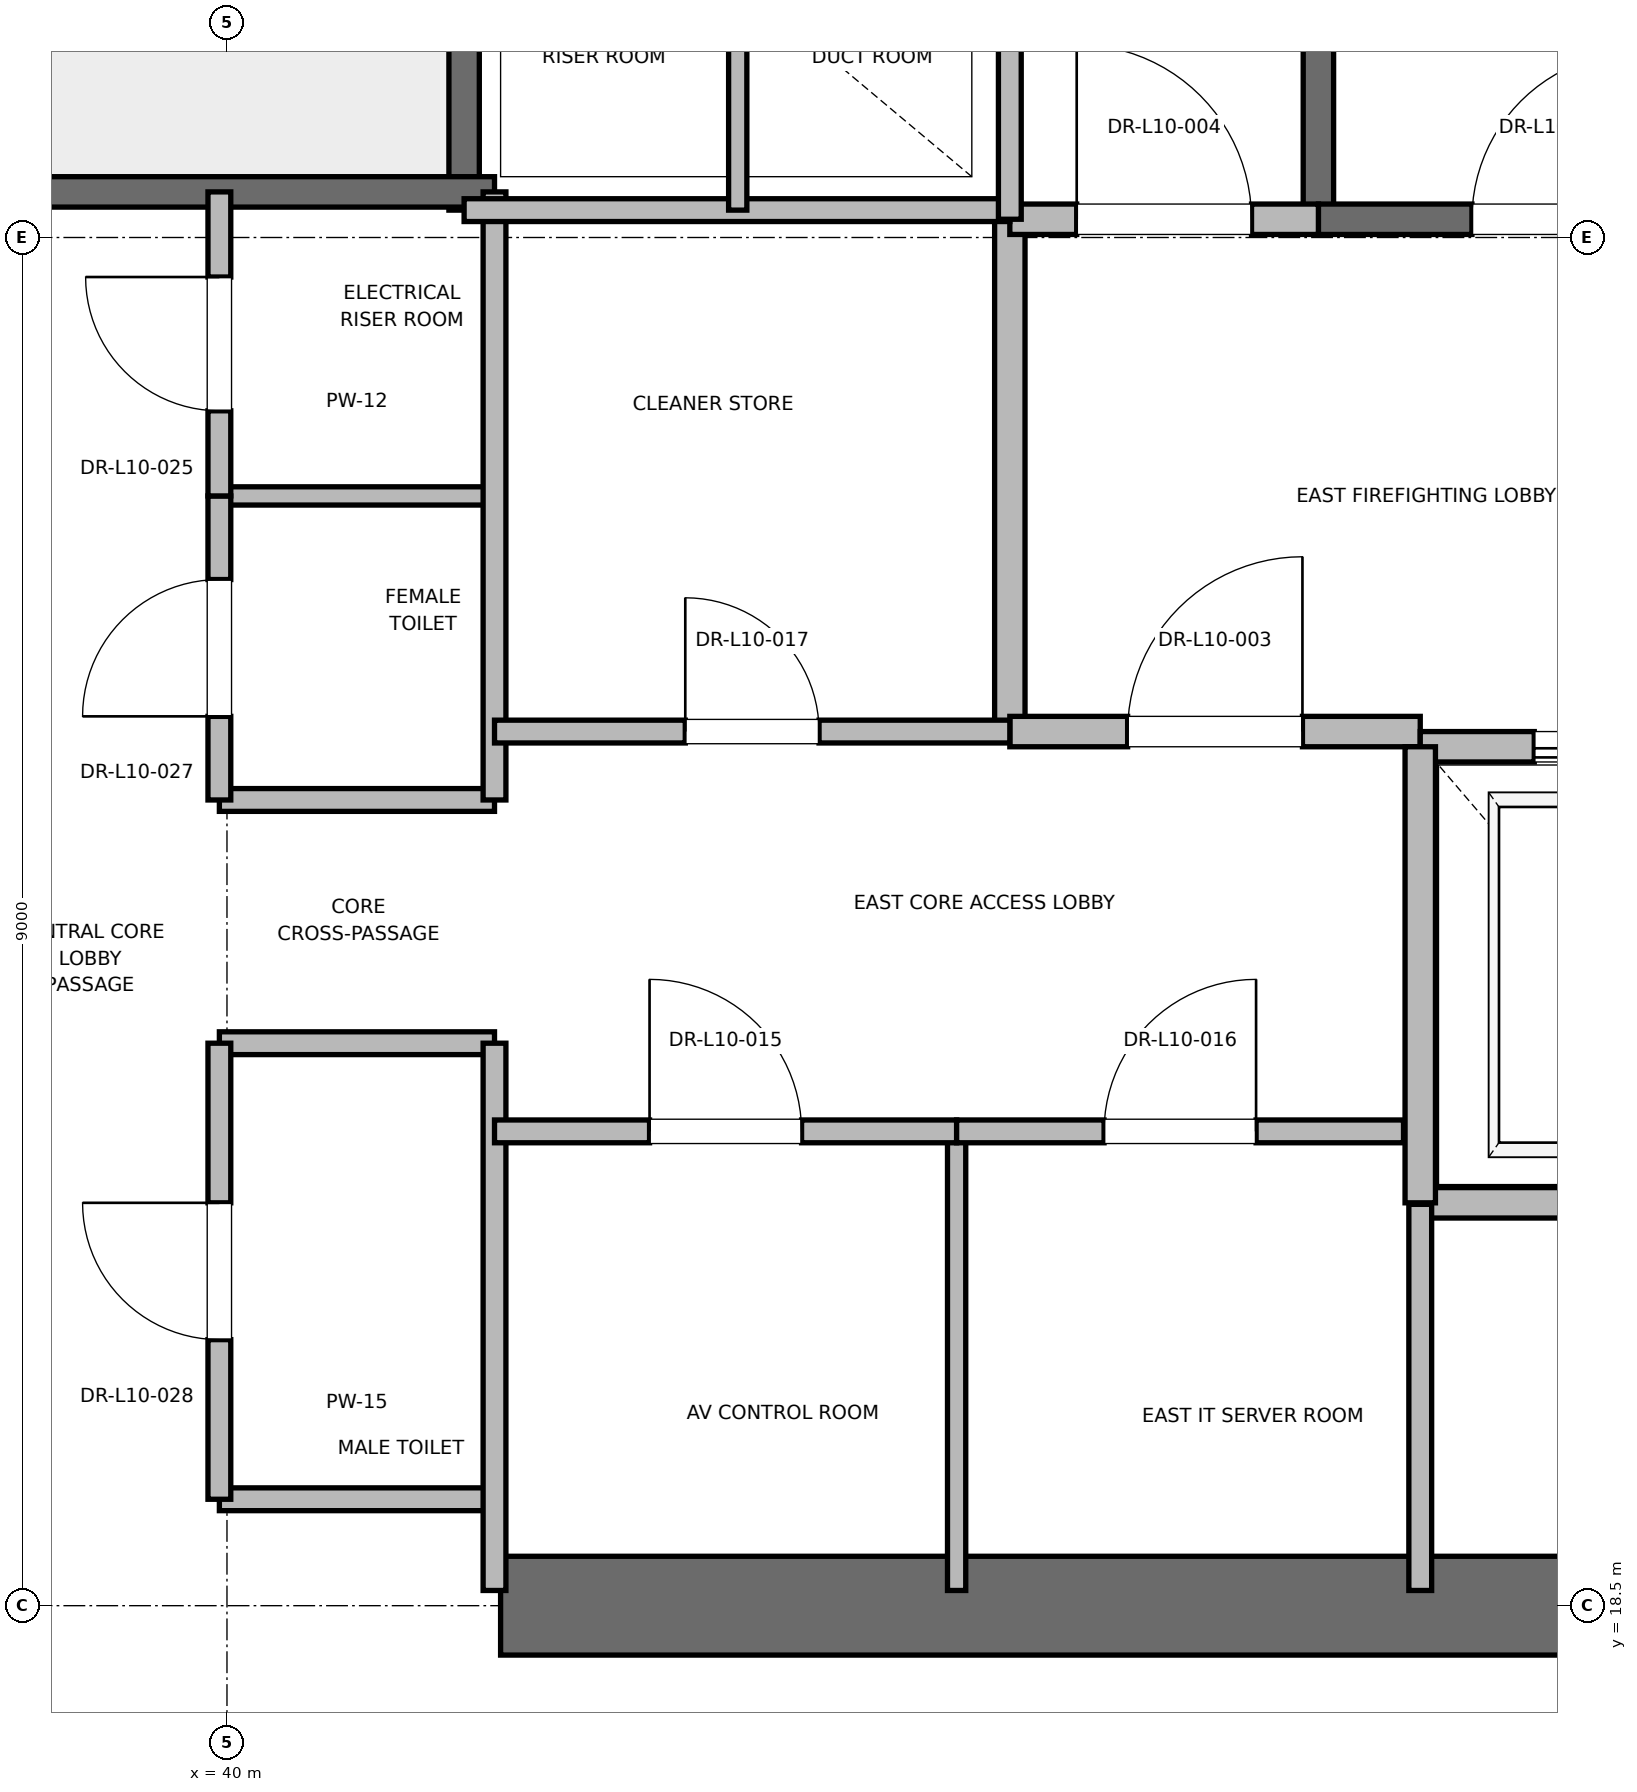
"""IFC4 building model, lengths in metres.
Left out: names, types, materials, properties, quantities, classifications, styles, units other than length and angle.
Written with IfcOpenShell. Run it as: python <this file> out.ifc"""

import sys

from ifc_helpers import new_model, si_unit, direction, frame, frame_2d, origin, place, context, subcontext, project, spatial, rectangle, extrude, element, fill, save


model = new_model("IFC4")
c1 = context("Model", 3, precision=1e-05, world=origin(), true_north=direction((0.0, 1.0)))
c2 = subcontext(c1, "Body", "Model", "MODEL_VIEW")
j1 = project(units=[si_unit("LENGTHUNIT", "METRE"), si_unit("PLANEANGLEUNIT", "RADIAN")], contexts=[c1])
p1 = place(None, origin())
s1 = spatial("IfcSite", under=j1, at=p1, CompositionType="ELEMENT")
p2 = place(p1, origin())
s2 = spatial("IfcBuilding", under=s1, at=p2, CompositionType="ELEMENT")
p3 = place(p2, frame((0.0, 0.0, 47.6)))
s3 = spatial("IfcBuildingStorey", under=s2, at=p3, CompositionType="ELEMENT", Elevation=47.6)
p4 = place(p3, frame((41.8, 18.5, 0.0), z_axis=(0.0, 0.0, 1.0), x_axis=(1.0, 0.0, 0.0)))
e1 = element("IfcWall", 1, at=p4, inside=s3, PredefinedType="SHEAR", context=c2, shape_type="SweptSolid", body=[
    extrude(rectangle(XDim=9.2, YDim=0.65, at=frame_2d((4.6, 0.0))), origin(), (0.0, 0.0, 1.0), 3.76),
])
p5 = place(p3, frame((47.18, 27.62, 0.0), z_axis=(0.0, 0.0, 1.0), x_axis=(0.0, 1.0, 0.0)))
e2 = element("IfcWall", 2, at=p5, inside=s3, PredefinedType="SOLIDWALL", context=c2, shape_type="SweptSolid", body=[
    extrude(rectangle(XDim=8.18, YDim=0.2, at=frame_2d((4.09, 0.0))), origin(), (0.0, 0.0, 1.0), 3.76),
])
p6 = place(p3, frame((47.18, 27.62, 0.0), z_axis=(0.0, 0.0, 1.0), x_axis=(1.0, 0.0, 0.0)))
e3 = element("IfcWall", 3, at=p6, inside=s3, PredefinedType="SOLIDWALL", context=c2, shape_type="SweptSolid", body=[
    extrude(rectangle(XDim=3.12, YDim=0.2, at=frame_2d((1.56, 0.0))), origin(), (0.0, 0.0, 1.0), 3.76),
])
p7 = place(p6, frame((1.01, 0.0, 0.0)))
e4 = element("IfcOpeningElement", 4, at=p7, cuts=e3, PredefinedType="OPENING", context=c2, shape_type="SweptSolid", body=[
    extrude(rectangle(XDim=1.1, YDim=2.15, at=frame_2d((0.55, 1.075))), frame((0.0, 0.1, 0.0), z_axis=(0.0, -1.0, 0.0), x_axis=(1.0, 0.0, 0.0)), (0.0, 0.0, 1.0), 0.2),
])
p8 = place(p3, frame((41.56, 27.68, 0.0), z_axis=(0.0, 0.0, 1.0), x_axis=(0.0, 1.0, 0.0)))
e5 = element("IfcWall", 5, at=p8, inside=s3, PredefinedType="SOLIDWALL", context=c2, shape_type="SweptSolid", body=[
    extrude(rectangle(XDim=8.57, YDim=0.2, at=frame_2d((4.285, 0.0))), origin(), (0.0, 0.0, 1.0), 3.76),
])
p9 = place(p3, frame((38.44, 27.8, 0.0), z_axis=(0.0, 0.0, 1.0), x_axis=(1.0, 0.0, 0.0)))
e6 = element("IfcWall", 6, at=p9, inside=s3, PredefinedType="SOLIDWALL", context=c2, shape_type="SweptSolid", body=[
    extrude(rectangle(XDim=3.32, YDim=0.2, at=frame_2d((1.66, 0.0))), origin(), (0.0, 0.0, 1.0), 3.76),
])
p10 = place(p3, frame((45.15, 24.25, 0.0), z_axis=(0.0, 0.0, 1.0), x_axis=(0.0, 1.0, 0.0)))
e7 = element("IfcWall", 7, at=p10, inside=s3, PredefinedType="PARTITIONING", context=c2, shape_type="SweptSolid", body=[
    extrude(rectangle(XDim=3.37, YDim=0.2, at=frame_2d((1.685, 0.0))), origin(), (0.0, 0.0, 1.0), 3.76),
])
p11 = place(p3, frame((45.15, 24.25, 0.0), z_axis=(0.0, 0.0, 1.0), x_axis=(1.0, 0.0, 0.0)))
e8 = element("IfcWall", 8, at=p11, inside=s3, PredefinedType="PARTITIONING", context=c2, shape_type="SweptSolid", body=[
    extrude(rectangle(XDim=2.7, YDim=0.2, at=frame_2d((1.35, 0.0))), origin(), (0.0, 0.0, 1.0), 3.76),
])
p12 = place(p11, frame((0.775, 0.0, 0.0)))
e9 = element("IfcOpeningElement", 9, at=p12, cuts=e8, PredefinedType="OPENING", context=c2, shape_type="SweptSolid", body=[
    extrude(rectangle(XDim=1.15, YDim=2.2, at=frame_2d((0.575, 1.1))), frame((0.0, 0.1, 0.0), z_axis=(0.0, -1.0, 0.0), x_axis=(1.0, 0.0, 0.0)), (0.0, 0.0, 1.0), 0.2),
])
p13 = place(p3, frame((45.15, 27.62, 0.0), z_axis=(0.0, 0.0, 1.0), x_axis=(1.0, 0.0, 0.0)))
e10 = element("IfcWall", 10, at=p13, inside=s3, PredefinedType="PARTITIONING", context=c2, shape_type="SweptSolid", body=[
    extrude(rectangle(XDim=2.03, YDim=0.2, at=frame_2d((1.015, 0.0))), origin(), (0.0, 0.0, 1.0), 3.76),
])
p14 = place(p13, frame((0.44, 0.0, 0.0)))
e11 = element("IfcOpeningElement", 11, at=p14, cuts=e10, PredefinedType="OPENING", context=c2, shape_type="SweptSolid", body=[
    extrude(rectangle(XDim=1.15, YDim=2.2, at=frame_2d((0.575, 1.1))), frame((0.0, 0.1, 0.0), z_axis=(0.0, -1.0, 0.0), x_axis=(1.0, 0.0, 0.0)), (0.0, 0.0, 1.0), 0.2),
])
p15 = place(p3, frame((47.85, 21.15, 0.0), z_axis=(0.0, 0.0, 1.0), x_axis=(1.0, 0.0, 0.0)))
e12 = element("IfcWall", 12, at=p15, inside=s3, PredefinedType="SOLIDWALL", context=c2, shape_type="SweptSolid", body=[
    extrude(rectangle(XDim=2.6, YDim=0.2, at=frame_2d((1.3, 0.0))), origin(), (0.0, 0.0, 1.0), 3.76),
])
p16 = place(p3, frame((50.45, 24.15, 0.0), z_axis=(0.0, 0.0, 1.0), x_axis=(-1.0, 0.0, 0.0)))
e13 = element("IfcWall", 13, at=p16, inside=s3, PredefinedType="SOLIDWALL", context=c2, shape_type="SweptSolid", body=[
    extrude(rectangle(XDim=2.6, YDim=0.2, at=frame_2d((1.3, 0.0))), origin(), (0.0, 0.0, 1.0), 2.54),
])
p17 = place(p16, frame((0.75, 0.0, 0.0)))
e14 = element("IfcOpeningElement", 14, at=p17, cuts=e13, PredefinedType="OPENING", context=c2, shape_type="SweptSolid", body=[
    extrude(rectangle(XDim=1.1, YDim=2.2, at=frame_2d((0.55, 1.1))), frame((0.0, 0.1, 0.0), z_axis=(0.0, -1.0, 0.0), x_axis=(1.0, 0.0, 0.0)), (0.0, 0.0, 1.0), 0.2),
])
p18 = place(p3, frame((47.85, 24.15, 0.0), z_axis=(0.0, 0.0, 1.0), x_axis=(0.0, -1.0, 0.0)))
e15 = element("IfcWall", 15, at=p18, inside=s3, PredefinedType="SOLIDWALL", context=c2, shape_type="SweptSolid", body=[
    extrude(rectangle(XDim=3.0, YDim=0.2, at=frame_2d((1.5, 0.0))), origin(), (0.0, 0.0, 1.0), 3.76),
])
for number, where, z_axis, x_axis in (
    (16, (39.95, 19.2, 0.0), (0.0, 0.0, 1.0), (1.0, 0.0, 0.0)),
    (17, (39.95, 22.2, 0.0), (0.0, 0.0, 1.0), (1.0, 0.0, 0.0)),
    (18, (39.95, 23.8, 0.0), (0.0, 0.0, 1.0), (1.0, 0.0, 0.0)),
):
    element("IfcWall", number, at=place(p3, frame(where, z_axis=z_axis, x_axis=x_axis)), inside=s3, PredefinedType="PARTITIONING", context=c2, shape_type="SweptSolid", body=[
        extrude(rectangle(XDim=1.81, YDim=0.15, at=frame_2d((0.905, 0.0))), origin(), (0.0, 0.0, 1.0), 2.85),
    ])
p19 = place(p3, frame((39.95, 25.8, 0.0), z_axis=(0.0, 0.0, 1.0), x_axis=(1.0, 0.0, 0.0)))
e19 = element("IfcWall", 19, at=p19, inside=s3, PredefinedType="PARTITIONING", context=c2, shape_type="SweptSolid", body=[
    extrude(rectangle(XDim=1.81, YDim=0.12, at=frame_2d((0.905, 0.0))), origin(), (0.0, 0.0, 1.0), 2.85),
])
p20 = place(p3, frame((41.76, 18.6, 0.0), z_axis=(0.0, 0.0, 1.0), x_axis=(0.0, 1.0, 0.0)))
e20 = element("IfcWall", 20, at=p20, inside=s3, PredefinedType="PARTITIONING", context=c2, shape_type="SweptSolid", body=[
    extrude(rectangle(XDim=3.6, YDim=0.15, at=frame_2d((1.8, 0.0))), origin(), (0.0, 0.0, 1.0), 2.54),
])
p21 = place(p3, frame((41.76, 23.8, 0.0), z_axis=(0.0, 0.0, 1.0), x_axis=(0.0, 1.0, 0.0)))
e21 = element("IfcWall", 21, at=p21, inside=s3, PredefinedType="PARTITIONING", context=c2, shape_type="SweptSolid", body=[
    extrude(rectangle(XDim=4.0, YDim=0.15, at=frame_2d((2.0, 0.0))), origin(), (0.0, 0.0, 1.0), 2.85),
])
p22 = place(p3, frame((39.95, 19.2, 0.0), z_axis=(0.0, 0.0, 1.0), x_axis=(0.0, 1.0, 0.0)))
e22 = element("IfcWall", 22, at=p22, inside=s3, PredefinedType="PARTITIONING", context=c2, shape_type="SweptSolid", body=[
    extrude(rectangle(XDim=3.0, YDim=0.15, at=frame_2d((1.5, 0.0))), origin(), (0.0, 0.0, 1.0), 2.85),
])
p23 = place(p22, frame((1.05, 0.0, 0.0)))
e23 = element("IfcOpeningElement", 23, at=p23, cuts=e22, PredefinedType="OPENING", context=c2, shape_type="SweptSolid", body=[
    extrude(rectangle(XDim=0.9, YDim=2.1, at=frame_2d((0.45, 1.05))), frame((0.0, 0.075, 0.0), z_axis=(0.0, -1.0, 0.0), x_axis=(1.0, 0.0, 0.0)), (0.0, 0.0, 1.0), 0.15),
])
p24 = place(p3, frame((39.95, 23.8, 0.0), z_axis=(0.0, 0.0, 1.0), x_axis=(0.0, 1.0, 0.0)))
e24 = element("IfcWall", 24, at=p24, inside=s3, PredefinedType="PARTITIONING", context=c2, shape_type="SweptSolid", body=[
    extrude(rectangle(XDim=2.0, YDim=0.15, at=frame_2d((1.0, 0.0))), origin(), (0.0, 0.0, 1.0), 2.85),
])
p25 = place(p24, frame((0.55, 0.0, 0.0)))
e25 = element("IfcOpeningElement", 25, at=p25, cuts=e24, PredefinedType="OPENING", context=c2, shape_type="SweptSolid", body=[
    extrude(rectangle(XDim=0.9, YDim=2.1, at=frame_2d((0.45, 1.05))), frame((0.0, 0.075, 0.0), z_axis=(0.0, -1.0, 0.0), x_axis=(1.0, 0.0, 0.0)), (0.0, 0.0, 1.0), 0.15),
])
p26 = place(p3, frame((39.95, 25.8, 0.0), z_axis=(0.0, 0.0, 1.0), x_axis=(0.0, 1.0, 0.0)))
e26 = element("IfcWall", 26, at=p26, inside=s3, PredefinedType="PARTITIONING", context=c2, shape_type="SweptSolid", body=[
    extrude(rectangle(XDim=2.0, YDim=0.15, at=frame_2d((1.0, 0.0))), origin(), (0.0, 0.0, 1.0), 2.85),
])
p27 = place(p26, frame((0.56, 0.0, 0.0)))
e27 = element("IfcOpeningElement", 27, at=p27, cuts=e26, PredefinedType="OPENING", context=c2, shape_type="SweptSolid", body=[
    extrude(rectangle(XDim=0.88, YDim=2.1, at=frame_2d((0.44, 1.05))), frame((0.0, 0.075, 0.0), z_axis=(0.0, -1.0, 0.0), x_axis=(1.0, 0.0, 0.0)), (0.0, 0.0, 1.0), 0.15),
])
p28 = place(p3, frame((41.56, 27.68, 0.0), z_axis=(0.0, 0.0, 1.0), x_axis=(1.0, 0.0, 0.0)))
e28 = element("IfcWall", 28, at=p28, inside=s3, PredefinedType="PARTITIONING", context=c2, shape_type="SweptSolid", body=[
    extrude(rectangle(XDim=3.59, YDim=0.15, at=frame_2d((1.795, 0.0))), origin(), (0.0, 0.0, 1.0), 2.85),
])
p29 = place(p3, frame((47.85, 18.6, 0.0), z_axis=(0.0, 0.0, 1.0), x_axis=(0.0, 1.0, 0.0)))
e29 = element("IfcWall", 29, at=p29, inside=s3, PredefinedType="PARTITIONING", context=c2, shape_type="SweptSolid", body=[
    extrude(rectangle(XDim=2.54, YDim=0.15, at=frame_2d((1.27, 0.0))), origin(), (0.0, 0.0, 1.0), 2.85),
])
p30 = place(p3, frame((44.8, 18.6, 0.0), z_axis=(0.0, 0.0, 1.0), x_axis=(0.0, 1.0, 0.0)))
e30 = element("IfcWall", 30, at=p30, inside=s3, PredefinedType="PARTITIONING", context=c2, shape_type="SweptSolid", body=[
    extrude(rectangle(XDim=3.02, YDim=0.12, at=frame_2d((1.51, 0.0))), origin(), (0.0, 0.0, 1.0), 2.85),
])
p31 = place(p3, frame((41.76, 21.62, 0.0), z_axis=(0.0, 0.0, 1.0), x_axis=(1.0, 0.0, 0.0)))
e31 = element("IfcWall", 31, at=p31, inside=s3, PredefinedType="PARTITIONING", context=c2, shape_type="SweptSolid", body=[
    extrude(rectangle(XDim=3.04, YDim=0.15, at=frame_2d((1.52, 0.0))), origin(), (0.0, 0.0, 1.0), 2.85),
])
p32 = place(p31, frame((1.02, 0.0, 0.0)))
e32 = element("IfcOpeningElement", 32, at=p32, cuts=e31, PredefinedType="OPENING", context=c2, shape_type="SweptSolid", body=[
    extrude(rectangle(XDim=1.0, YDim=2.15, at=frame_2d((0.5, 1.075))), frame((0.0, 0.075, 0.0), z_axis=(0.0, -1.0, 0.0), x_axis=(1.0, 0.0, 0.0)), (0.0, 0.0, 1.0), 0.15),
])
p33 = place(p3, frame((44.8, 21.62, 0.0), z_axis=(0.0, 0.0, 1.0), x_axis=(1.0, 0.0, 0.0)))
e33 = element("IfcWall", 33, at=p33, inside=s3, PredefinedType="PARTITIONING", context=c2, shape_type="SweptSolid", body=[
    extrude(rectangle(XDim=2.94, YDim=0.15, at=frame_2d((1.47, 0.0))), origin(), (0.0, 0.0, 1.0), 2.85),
])
p34 = place(p33, frame((0.97, 0.0, 0.0)))
e34 = element("IfcOpeningElement", 34, at=p34, cuts=e33, PredefinedType="OPENING", context=c2, shape_type="SweptSolid", body=[
    extrude(rectangle(XDim=1.0, YDim=2.15, at=frame_2d((0.5, 1.075))), frame((0.0, 0.075, 0.0), z_axis=(0.0, -1.0, 0.0), x_axis=(1.0, 0.0, 0.0)), (0.0, 0.0, 1.0), 0.15),
])
p35 = place(p3, frame((41.76, 24.25, 0.0), z_axis=(0.0, 0.0, 1.0), x_axis=(1.0, 0.0, 0.0)))
e35 = element("IfcWall", 35, at=p35, inside=s3, PredefinedType="PARTITIONING", context=c2, shape_type="SweptSolid", body=[
    extrude(rectangle(XDim=3.39, YDim=0.15, at=frame_2d((1.695, 0.0))), origin(), (0.0, 0.0, 1.0), 2.85),
])
p36 = place(p35, frame((1.255, 0.0, 0.0)))
e36 = element("IfcOpeningElement", 36, at=p36, cuts=e35, PredefinedType="OPENING", context=c2, shape_type="SweptSolid", body=[
    extrude(rectangle(XDim=0.88, YDim=2.1, at=frame_2d((0.44, 1.05))), frame((0.0, 0.075, 0.0), z_axis=(0.0, -1.0, 0.0), x_axis=(1.0, 0.0, 0.0)), (0.0, 0.0, 1.0), 0.15),
])
p37 = place(p3, frame((45.15, 27.62, 0.0), z_axis=(0.0, 0.0, 1.0), x_axis=(0.0, 1.0, 0.0)))
e37 = element("IfcWall", 37, at=p37, inside=s3, PredefinedType="PARTITIONING", context=c2, shape_type="SweptSolid", body=[
    extrude(rectangle(XDim=3.1, YDim=0.15, at=frame_2d((1.55, 0.0))), origin(), (0.0, 0.0, 1.0), 2.85),
])
p38 = place(p3, frame((43.36, 27.68, 0.0), z_axis=(0.0, 0.0, 1.0), x_axis=(0.0, 1.0, 0.0)))
e38 = element("IfcWall", 38, at=p38, inside=s3, PredefinedType="PARTITIONING", context=c2, shape_type="SweptSolid", body=[
    extrude(rectangle(XDim=3.04, YDim=0.12, at=frame_2d((1.52, 0.0))), origin(), (0.0, 0.0, 1.0), 2.85),
])
p39 = place(p7, origin())
e39 = element("IfcDoor", 39, at=p39, inside=s3, OperationType="SINGLE_SWING_RIGHT", PredefinedType="DOOR", context=c2, shape_type="SweptSolid", body=[
    extrude(rectangle(XDim=1.1, YDim=2.15, at=frame_2d((0.55, 1.075))), frame((0.0, 0.025, 0.0), z_axis=(0.0, -1.0, 0.0), x_axis=(1.0, 0.0, 0.0)), (0.0, 0.0, 1.0), 0.05),
])
fill(e4, e39)
p40 = place(p12, origin())
e40 = element("IfcDoor", 40, at=p40, inside=s3, OperationType="SINGLE_SWING_RIGHT", PredefinedType="DOOR", context=c2, shape_type="SweptSolid", body=[
    extrude(rectangle(XDim=1.15, YDim=2.2, at=frame_2d((0.575, 1.1))), frame((0.0, 0.025, 0.0), z_axis=(0.0, -1.0, 0.0), x_axis=(1.0, 0.0, 0.0)), (0.0, 0.0, 1.0), 0.05),
])
fill(e9, e40)
p41 = place(p14, origin())
e41 = element("IfcDoor", 41, at=p41, inside=s3, OperationType="SINGLE_SWING_LEFT", PredefinedType="DOOR", context=c2, shape_type="SweptSolid", body=[
    extrude(rectangle(XDim=1.15, YDim=2.2, at=frame_2d((0.575, 1.1))), frame((0.0, 0.025, 0.0), z_axis=(0.0, -1.0, 0.0), x_axis=(1.0, 0.0, 0.0)), (0.0, 0.0, 1.0), 0.05),
])
fill(e11, e41)
p42 = place(p17, origin())
e42 = element("IfcDoor", 42, at=p42, inside=s3, OperationType="SLIDING_TO_RIGHT", PredefinedType="DOOR", context=c2, shape_type="SweptSolid", body=[
    extrude(rectangle(XDim=1.1, YDim=2.2, at=frame_2d((0.55, 1.1))), frame((0.0, 0.025, 0.0), z_axis=(0.0, -1.0, 0.0), x_axis=(1.0, 0.0, 0.0)), (0.0, 0.0, 1.0), 0.05),
])
fill(e14, e42)
p43 = place(p23, origin())
e43 = element("IfcDoor", 43, at=p43, inside=s3, OperationType="SINGLE_SWING_RIGHT", PredefinedType="DOOR", context=c2, shape_type="SweptSolid", body=[
    extrude(rectangle(XDim=0.9, YDim=2.1, at=frame_2d((0.45, 1.05))), frame((0.0, 0.025, 0.0), z_axis=(0.0, -1.0, 0.0), x_axis=(1.0, 0.0, 0.0)), (0.0, 0.0, 1.0), 0.05),
])
fill(e23, e43)
p44 = place(p25, origin())
e44 = element("IfcDoor", 44, at=p44, inside=s3, OperationType="SINGLE_SWING_LEFT", PredefinedType="DOOR", context=c2, shape_type="SweptSolid", body=[
    extrude(rectangle(XDim=0.9, YDim=2.1, at=frame_2d((0.45, 1.05))), frame((0.0, 0.025, 0.0), z_axis=(0.0, -1.0, 0.0), x_axis=(1.0, 0.0, 0.0)), (0.0, 0.0, 1.0), 0.05),
])
fill(e25, e44)
p45 = place(p27, origin())
e45 = element("IfcDoor", 45, at=p45, inside=s3, OperationType="SINGLE_SWING_RIGHT", PredefinedType="DOOR", context=c2, shape_type="SweptSolid", body=[
    extrude(rectangle(XDim=0.88, YDim=2.1, at=frame_2d((0.44, 1.05))), frame((0.0, 0.025, 0.0), z_axis=(0.0, -1.0, 0.0), x_axis=(1.0, 0.0, 0.0)), (0.0, 0.0, 1.0), 0.05),
])
fill(e27, e45)
p46 = place(p32, origin())
e46 = element("IfcDoor", 46, at=p46, inside=s3, OperationType="SINGLE_SWING_LEFT", PredefinedType="DOOR", context=c2, shape_type="SweptSolid", body=[
    extrude(rectangle(XDim=1.0, YDim=2.15, at=frame_2d((0.5, 1.075))), frame((0.0, 0.025, 0.0), z_axis=(0.0, -1.0, 0.0), x_axis=(1.0, 0.0, 0.0)), (0.0, 0.0, 1.0), 0.05),
])
fill(e32, e46)
p47 = place(p34, origin())
e47 = element("IfcDoor", 47, at=p47, inside=s3, OperationType="SINGLE_SWING_RIGHT", PredefinedType="DOOR", context=c2, shape_type="SweptSolid", body=[
    extrude(rectangle(XDim=1.0, YDim=2.15, at=frame_2d((0.5, 1.075))), frame((0.0, 0.025, 0.0), z_axis=(0.0, -1.0, 0.0), x_axis=(1.0, 0.0, 0.0)), (0.0, 0.0, 1.0), 0.05),
])
fill(e34, e47)
p48 = place(p36, origin())
e48 = element("IfcDoor", 48, at=p48, inside=s3, OperationType="SINGLE_SWING_LEFT", PredefinedType="DOOR", context=c2, shape_type="SweptSolid", body=[
    extrude(rectangle(XDim=0.88, YDim=2.1, at=frame_2d((0.44, 1.05))), frame((0.0, 0.025, 0.0), z_axis=(0.0, -1.0, 0.0), x_axis=(1.0, 0.0, 0.0)), (0.0, 0.0, 1.0), 0.05),
])
fill(e36, e48)
save(model, sys.argv[1])
